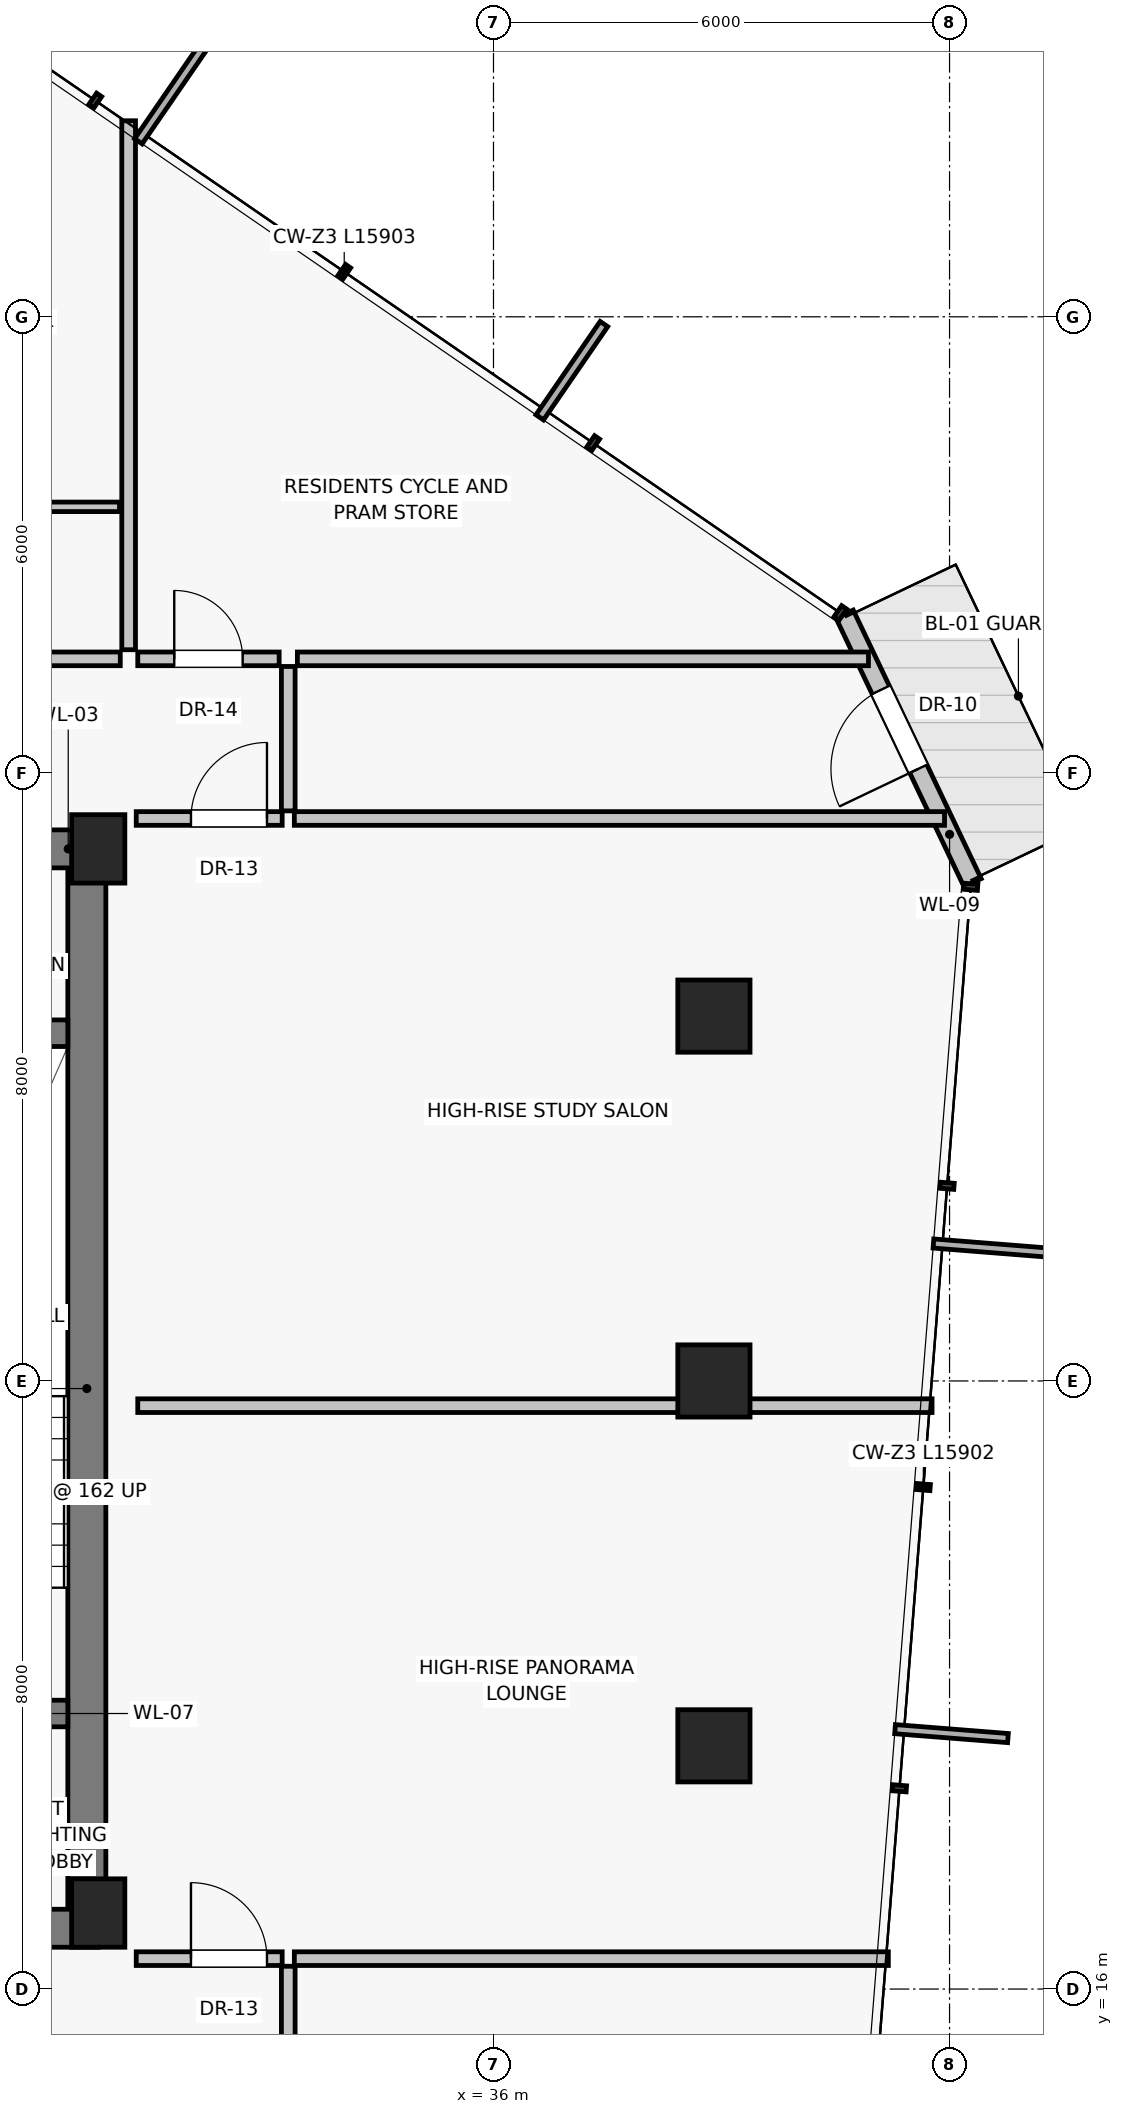
"""IFC4 building model, lengths in metres.
Left out: names, types, materials, properties, quantities, classifications, styles, units other than length and angle.
Written with IfcOpenShell. Run it as: python <this file> out.ifc"""

import sys

from ifc_helpers import new_model, si_unit, direction, frame, frame_2d, origin, origin_2d, place, context, subcontext, project, spatial, rectangle, extrude, source, transform, mapped, element, fill, save


model = new_model("IFC4")
c1 = context("Model", 3, precision=1e-05, world=origin(), true_north=direction((0.0, 1.0)))
c2 = subcontext(c1, "Body", "Model", "MODEL_VIEW")
j1 = project(units=[si_unit("LENGTHUNIT", "METRE"), si_unit("PLANEANGLEUNIT", "RADIAN")], contexts=[c1])
p1 = place(None, origin())
s1 = spatial("IfcSite", under=j1, at=p1, CompositionType="ELEMENT")
p2 = place(p1, origin())
s2 = spatial("IfcBuilding", under=s1, at=p2, CompositionType="ELEMENT")
p3 = place(p2, frame((0.0, 0.0, 222.15)))
s3 = spatial("IfcBuildingStorey", under=s2, at=p3, CompositionType="ELEMENT", Elevation=222.15)
for number, where, z_axis, x_axis in (
    (1, (30.8, 17.0, 0.0), (0.0, 0.0, 1.0), (1.0, 0.0, 0.0)),
    (2, (30.8, 31.0, 0.0), (0.0, 0.0, 1.0), (1.0, 0.0, 0.0)),
):
    element("IfcColumn", number, at=place(p3, frame(where, z_axis=z_axis, x_axis=x_axis)), inside=s3, PredefinedType="PILASTER", context=c2, shape_type="SweptSolid", body=[
        extrude(rectangle(XDim=0.7, YDim=0.9, at=origin_2d()), origin(), (0.0, 0.0, 1.0), 3.25),
    ])
for number, where, z_axis, x_axis in (
    (3, (38.9, 19.2, 0.0), (0.0, 0.0, 1.0), (1.0, 0.0, 0.0)),
    (4, (38.9, 24.0, 0.0), (0.0, 0.0, 1.0), (1.0, 0.0, 0.0)),
    (5, (38.9, 28.8, 0.0), (0.0, 0.0, 1.0), (1.0, 0.0, 0.0)),
):
    element("IfcColumn", number, at=place(p3, frame(where, z_axis=z_axis, x_axis=x_axis)), inside=s3, PredefinedType="COLUMN", context=c2, shape_type="SweptSolid", body=[
        extrude(rectangle(XDim=0.95, YDim=0.95, at=origin_2d()), origin(), (0.0, 0.0, 1.0), 3.25),
    ])
p4 = place(p3, frame((42.304, 30.554, 0.0), z_axis=(0.0, 0.0, 1.0), x_axis=(-0.43021923284, 0.902724438406, 0.0)))
e6 = element("IfcWall", 6, at=p4, inside=s3, PredefinedType="SOLIDWALL", context=c2, shape_type="SweptSolid", body=[
    extrude(rectangle(XDim=3.915, YDim=0.25, at=frame_2d((1.957, 0.0))), origin(), (0.0, 0.0, 1.0), 2.93),
])
p5 = place(p4, frame((1.66, 0.0, 0.0)))
e7 = element("IfcOpeningElement", 7, at=p5, cuts=e6, PredefinedType="OPENING", context=c2, shape_type="SweptSolid", body=[
    extrude(rectangle(XDim=1.15, YDim=2.25, at=frame_2d((0.575, 1.125))), frame((0.0, 0.135, 0.0), z_axis=(0.0, -1.0, 0.0), x_axis=(1.0, 0.0, 0.0)), (0.0, 0.0, 1.0), 0.27),
])
p6 = place(p3, frame((30.65, 16.8, 0.0), z_axis=(0.0, 0.0, 1.0), x_axis=(0.0, 1.0, 0.0)))
e8 = element("IfcWall", 8, at=p6, inside=s3, PredefinedType="SHEAR", context=c2, shape_type="SweptSolid", body=[
    extrude(rectangle(XDim=14.2, YDim=0.5, at=frame_2d((7.1, 0.0))), origin(), (0.0, 0.0, 1.0), 2.93),
])
p7 = place(p3, frame((24.95, 16.8, 0.0), z_axis=(0.0, 0.0, 1.0), x_axis=(1.0, 0.0, 0.0)))
e9 = element("IfcWall", 9, at=p7, inside=s3, PredefinedType="SHEAR", context=c2, shape_type="SweptSolid", body=[
    extrude(rectangle(XDim=5.85, YDim=0.5, at=frame_2d((2.925, 0.0))), origin(), (0.0, 0.0, 1.0), 2.93),
])
p8 = place(p7, frame((2.15, 0.0, 0.0)))
e10 = element("IfcOpeningElement", 10, at=p8, cuts=e9, PredefinedType="OPENING", context=c2, shape_type="SweptSolid", body=[
    extrude(rectangle(XDim=1.2, YDim=2.03, at=frame_2d((0.6, 1.015))), frame((0.0, 0.26, 0.0), z_axis=(0.0, -1.0, 0.0), x_axis=(1.0, 0.0, 0.0)), (0.0, 0.0, 1.0), 0.52),
])
p9 = place(p3, frame((27.0, 31.0, 0.0), z_axis=(0.0, 0.0, 1.0), x_axis=(1.0, 0.0, 0.0)))
e11 = element("IfcWall", 11, at=p9, inside=s3, PredefinedType="SHEAR", context=c2, shape_type="SweptSolid", body=[
    extrude(rectangle(XDim=3.8, YDim=0.5, at=frame_2d((1.9, 0.0))), origin(), (0.0, 0.0, 1.0), 2.93),
])
p10 = place(p9, frame((0.45, 0.0, 0.0)))
e12 = element("IfcOpeningElement", 12, at=p10, cuts=e11, PredefinedType="OPENING", context=c2, shape_type="SweptSolid", body=[
    extrude(rectangle(XDim=0.86, YDim=2.01, at=frame_2d((0.43, 1.005))), frame((0.0, 0.26, 0.0), z_axis=(0.0, -1.0, 0.0), x_axis=(1.0, 0.0, 0.0)), (0.0, 0.0, 1.0), 0.52),
])
p11 = place(p9, frame((1.9, 0.0, 0.0)))
e13 = element("IfcOpeningElement", 13, at=p11, cuts=e11, PredefinedType="OPENING", context=c2, shape_type="SweptSolid", body=[
    extrude(rectangle(XDim=0.86, YDim=2.01, at=frame_2d((0.43, 1.005))), frame((0.0, 0.26, 0.0), z_axis=(0.0, -1.0, 0.0), x_axis=(1.0, 0.0, 0.0)), (0.0, 0.0, 1.0), 0.52),
])
p12 = place(p3, frame((27.025, 19.625, 0.0), z_axis=(0.0, 0.0, 1.0), x_axis=(1.0, 0.0, 0.0)))
e14 = element("IfcWall", 14, at=p12, inside=s3, PredefinedType="SHEAR", context=c2, shape_type="SweptSolid", body=[
    extrude(rectangle(XDim=3.375, YDim=0.35, at=frame_2d((1.688, 0.0))), origin(), (0.0, 0.0, 1.0), 2.93),
])
p13 = place(p12, frame((1.05, 0.0, 0.0)))
e15 = element("IfcOpeningElement", 15, at=p13, cuts=e14, PredefinedType="OPENING", context=c2, shape_type="SweptSolid", body=[
    extrude(rectangle(XDim=1.1, YDim=2.03, at=frame_2d((0.55, 1.015))), frame((0.0, 0.185, 0.0), z_axis=(0.0, -1.0, 0.0), x_axis=(1.0, 0.0, 0.0)), (0.0, 0.0, 1.0), 0.37),
])
p14 = place(p3, frame((27.025, 28.575, 0.0), z_axis=(0.0, 0.0, 1.0), x_axis=(1.0, 0.0, 0.0)))
e16 = element("IfcWall", 16, at=p14, inside=s3, PredefinedType="SHEAR", context=c2, shape_type="SweptSolid", body=[
    extrude(rectangle(XDim=3.375, YDim=0.35, at=frame_2d((1.688, 0.0))), origin(), (0.0, 0.0, 1.0), 2.93),
])
p15 = place(p3, frame((31.2, 33.62, 0.0), z_axis=(0.0, 0.0, 1.0), x_axis=(0.0, 1.0, 0.0)))
e17 = element("IfcWall", 17, at=p15, inside=s3, PredefinedType="PARTITIONING", context=c2, shape_type="SweptSolid", body=[
    extrude(rectangle(XDim=6.959, YDim=0.18, at=frame_2d((3.479, 0.0))), origin(), (0.0, 0.0, 1.0), 2.93),
])
p16 = place(p3, frame((19.31, 33.5, 0.0), z_axis=(0.0, 0.0, 1.0), x_axis=(1.0, 0.0, 0.0)))
e18 = element("IfcWall", 18, at=p16, inside=s3, PredefinedType="PARTITIONING", context=c2, shape_type="SweptSolid", body=[
    extrude(rectangle(XDim=11.78, YDim=0.18, at=frame_2d((5.89, 0.0))), origin(), (0.0, 0.0, 1.0), 2.93),
])
p17 = place(p16, frame((3.98, 0.0, 0.0)))
e19 = element("IfcOpeningElement", 19, at=p17, cuts=e18, PredefinedType="OPENING", context=c2, shape_type="SweptSolid", body=[
    extrude(rectangle(XDim=0.95, YDim=2.02, at=frame_2d((0.475, 1.01))), frame((0.0, 0.1, 0.0), z_axis=(0.0, -1.0, 0.0), x_axis=(1.0, 0.0, 0.0)), (0.0, 0.0, 1.0), 0.2),
])
p18 = place(p3, frame((26.18, 35.5, 0.0), z_axis=(0.0, 0.0, 1.0), x_axis=(1.0, 0.0, 0.0)))
e20 = element("IfcWall", 20, at=p18, inside=s3, PredefinedType="PARTITIONING", context=c2, shape_type="SweptSolid", body=[
    extrude(rectangle(XDim=4.9, YDim=0.125, at=frame_2d((2.45, 0.0))), origin(), (0.0, 0.0, 1.0), 2.577),
])
p19 = place(p3, frame((31.32, 23.675, 0.0), z_axis=(0.0, 0.0, 1.0), x_axis=(1.0, 0.0, 0.0)))
e21 = element("IfcWall", 21, at=p19, inside=s3, PredefinedType="PARTITIONING", context=c2, shape_type="SweptSolid", body=[
    extrude(rectangle(XDim=10.45, YDim=0.18, at=frame_2d((5.225, 0.0))), origin(), (0.0, 0.0, 1.0), 2.93),
])
p20 = place(p3, frame((33.3, 14.4, 0.0), z_axis=(0.0, 0.0, 1.0), x_axis=(0.0, 1.0, 0.0)))
e22 = element("IfcWall", 22, at=p20, inside=s3, PredefinedType="PARTITIONING", context=c2, shape_type="SweptSolid", body=[
    extrude(rectangle(XDim=1.9, YDim=0.18, at=frame_2d((0.95, 0.0))), origin(), (0.0, 0.0, 1.0), 2.93),
])
p21 = place(p3, frame((33.3, 31.5, 0.0), z_axis=(0.0, 0.0, 1.0), x_axis=(0.0, 1.0, 0.0)))
e23 = element("IfcWall", 23, at=p21, inside=s3, PredefinedType="PARTITIONING", context=c2, shape_type="SweptSolid", body=[
    extrude(rectangle(XDim=1.9, YDim=0.18, at=frame_2d((0.95, 0.0))), origin(), (0.0, 0.0, 1.0), 2.93),
])
p22 = place(p3, frame((31.3, 16.4, 0.0), z_axis=(0.0, 0.0, 1.0), x_axis=(1.0, 0.0, 0.0)))
e24 = element("IfcWall", 24, at=p22, inside=s3, PredefinedType="PARTITIONING", context=c2, shape_type="SweptSolid", body=[
    extrude(rectangle(XDim=1.92, YDim=0.18, at=frame_2d((0.96, 0.0))), origin(), (0.0, 0.0, 1.0), 2.93),
])
p23 = place(p22, frame((0.72, 0.0, 0.0)))
e25 = element("IfcOpeningElement", 25, at=p23, cuts=e24, PredefinedType="OPENING", context=c2, shape_type="SweptSolid", body=[
    extrude(rectangle(XDim=1.0, YDim=2.01, at=frame_2d((0.5, 1.005))), frame((0.0, 0.1, 0.0), z_axis=(0.0, -1.0, 0.0), x_axis=(1.0, 0.0, 0.0)), (0.0, 0.0, 1.0), 0.2),
])
p24 = place(p3, frame((33.38, 16.4, 0.0), z_axis=(0.0, 0.0, 1.0), x_axis=(1.0, 0.0, 0.0)))
e26 = element("IfcWall", 26, at=p24, inside=s3, PredefinedType="PARTITIONING", context=c2, shape_type="SweptSolid", body=[
    extrude(rectangle(XDim=7.815, YDim=0.18, at=frame_2d((3.907, 0.0))), origin(), (0.0, 0.0, 1.0), 2.93),
])
p25 = place(p3, frame((31.3, 31.4, 0.0), z_axis=(0.0, 0.0, 1.0), x_axis=(1.0, 0.0, 0.0)))
e27 = element("IfcWall", 27, at=p25, inside=s3, PredefinedType="PARTITIONING", context=c2, shape_type="SweptSolid", body=[
    extrude(rectangle(XDim=1.92, YDim=0.18, at=frame_2d((0.96, 0.0))), origin(), (0.0, 0.0, 1.0), 2.93),
])
p26 = place(p25, frame((0.72, 0.0, 0.0)))
e28 = element("IfcOpeningElement", 28, at=p26, cuts=e27, PredefinedType="OPENING", context=c2, shape_type="SweptSolid", body=[
    extrude(rectangle(XDim=1.0, YDim=2.01, at=frame_2d((0.5, 1.005))), frame((0.0, 0.1, 0.0), z_axis=(0.0, -1.0, 0.0), x_axis=(1.0, 0.0, 0.0)), (0.0, 0.0, 1.0), 0.2),
])
p27 = place(p3, frame((33.38, 31.4, 0.0), z_axis=(0.0, 0.0, 1.0), x_axis=(1.0, 0.0, 0.0)))
e29 = element("IfcWall", 29, at=p27, inside=s3, PredefinedType="PARTITIONING", context=c2, shape_type="SweptSolid", body=[
    extrude(rectangle(XDim=8.554, YDim=0.18, at=frame_2d((4.277, 0.0))), origin(), (0.0, 0.0, 1.0), 2.93),
])
p28 = place(p3, frame((33.42, 33.5, 0.0), z_axis=(0.0, 0.0, 1.0), x_axis=(1.0, 0.0, 0.0)))
e30 = element("IfcWall", 30, at=p28, inside=s3, PredefinedType="PARTITIONING", context=c2, shape_type="SweptSolid", body=[
    extrude(rectangle(XDim=7.513, YDim=0.18, at=frame_2d((3.757, 0.0))), origin(), (0.0, 0.0, 1.0), 2.93),
])
p29 = place(p3, frame((31.32, 33.5, 0.0), z_axis=(0.0, 0.0, 1.0), x_axis=(1.0, 0.0, 0.0)))
e31 = element("IfcWall", 31, at=p29, inside=s3, PredefinedType="PARTITIONING", context=c2, shape_type="SweptSolid", body=[
    extrude(rectangle(XDim=1.86, YDim=0.18, at=frame_2d((0.93, 0.0))), origin(), (0.0, 0.0, 1.0), 2.93),
])
p30 = place(p29, frame((0.48, 0.0, 0.0)))
e32 = element("IfcOpeningElement", 32, at=p30, cuts=e31, PredefinedType="OPENING", context=c2, shape_type="SweptSolid", body=[
    extrude(rectangle(XDim=0.9, YDim=2.01, at=frame_2d((0.45, 1.005))), frame((0.0, 0.1, 0.0), z_axis=(0.0, -1.0, 0.0), x_axis=(1.0, 0.0, 0.0)), (0.0, 0.0, 1.0), 0.2),
])
m1 = source(origin(), c2, "Body", "SweptSolid", [
    extrude(rectangle(XDim=1.15, YDim=2.25, at=frame_2d((0.575, 1.125))), frame((0.0, 0.025, 0.0), z_axis=(0.0, -1.0, 0.0), x_axis=(1.0, 0.0, 0.0)), (0.0, 0.0, 1.0), 0.05),
])
p31 = place(p5, frame((1.15, 0.0, 0.0), z_axis=(0.0, 0.0, 1.0), x_axis=(-1.0, 0.0, 0.0)))
e33 = element("IfcDoor", 33, at=p31, inside=s3, OperationType="SINGLE_SWING_LEFT", PredefinedType="DOOR", context=c2, shape_type="MappedRepresentation", body=[
    mapped(m1, transform((0.0, 0.0, 0.0), scale=1.0)),
])
fill(e7, e33)
m2 = source(origin(), c2, "Body", "SweptSolid", [
    extrude(rectangle(XDim=1.0, YDim=2.01, at=frame_2d((0.5, 1.005))), frame((0.0, 0.025, 0.0), z_axis=(0.0, -1.0, 0.0), x_axis=(1.0, 0.0, 0.0)), (0.0, 0.0, 1.0), 0.05),
])
p32 = place(p23, origin())
e34 = element("IfcDoor", 34, at=p32, inside=s3, OperationType="SINGLE_SWING_LEFT", PredefinedType="DOOR", context=c2, shape_type="MappedRepresentation", body=[
    mapped(m2, transform((0.0, 0.0, 0.0), scale=1.0)),
])
fill(e25, e34)
p33 = place(p26, origin())
e35 = element("IfcDoor", 35, at=p33, inside=s3, OperationType="SINGLE_SWING_RIGHT", PredefinedType="DOOR", context=c2, shape_type="MappedRepresentation", body=[
    mapped(m2, transform((0.0, 0.0, 0.0), scale=1.0)),
])
fill(e28, e35)
m3 = source(origin(), c2, "Body", "SweptSolid", [
    extrude(rectangle(XDim=0.9, YDim=2.01, at=frame_2d((0.45, 1.005))), frame((0.0, 0.025, 0.0), z_axis=(0.0, -1.0, 0.0), x_axis=(1.0, 0.0, 0.0)), (0.0, 0.0, 1.0), 0.05),
])
p34 = place(p30, origin())
e36 = element("IfcDoor", 36, at=p34, inside=s3, OperationType="SINGLE_SWING_LEFT", PredefinedType="DOOR", context=c2, shape_type="MappedRepresentation", body=[
    mapped(m3, transform((0.0, 0.0, 0.0), scale=1.0)),
])
fill(e32, e36)
save(model, sys.argv[1])
